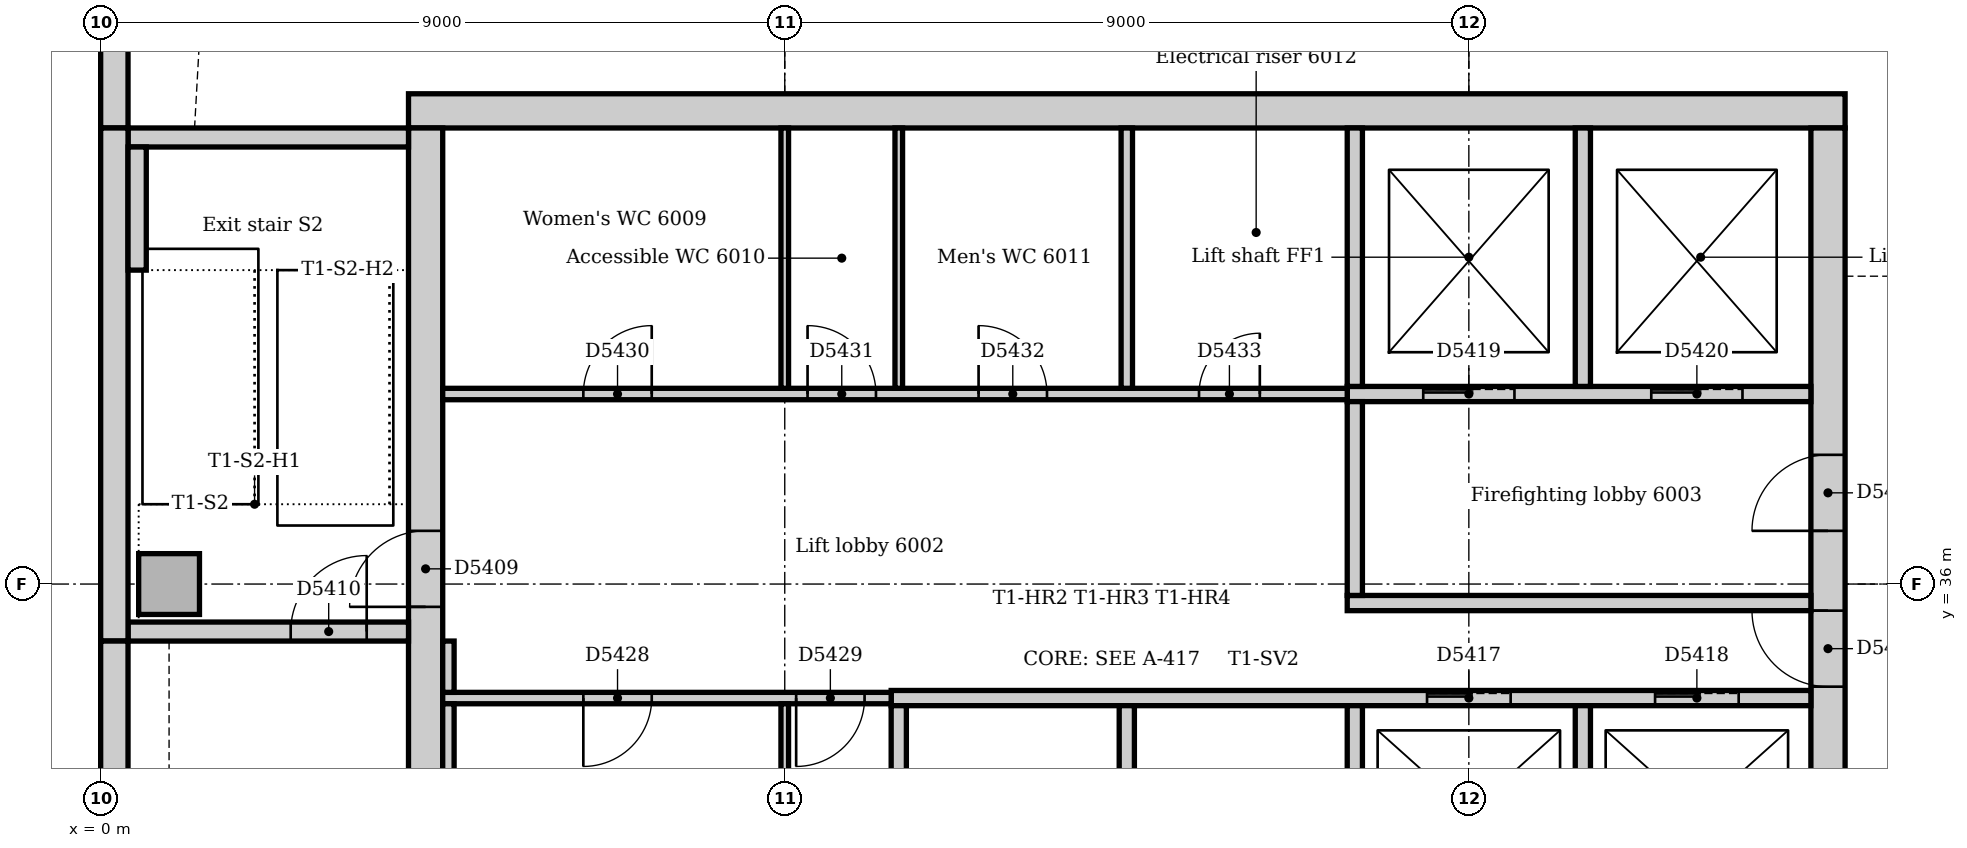
"""IFC4 building model, lengths in metres.
Left out: names, types, materials, properties, quantities, classifications, styles, units other than length and angle.
Written with IfcOpenShell. Run it as: python <this file> out.ifc"""

import sys

from ifc_helpers import new_model, si_unit, direction, frame, frame_2d, origin, origin_2d, place, context, subcontext, project, spatial, rectangle, extrude, element, fill, save


model = new_model("IFC4")
c1 = context("Model", 3, precision=1e-05, world=origin(), true_north=direction((0.0, 1.0)))
c2 = subcontext(c1, "Body", "Model", "MODEL_VIEW")
j1 = project(units=[si_unit("LENGTHUNIT", "METRE"), si_unit("PLANEANGLEUNIT", "RADIAN")], contexts=[c1])
p1 = place(None, origin())
s1 = spatial("IfcSite", under=j1, at=p1, CompositionType="ELEMENT")
p2 = place(p1, origin())
s2 = spatial("IfcBuilding", under=s1, at=p2, CompositionType="ELEMENT")
p3 = place(p2, frame((0.0, 0.0, 251.0)))
s3 = spatial("IfcBuildingStorey", under=s2, at=p3, CompositionType="ELEMENT", Elevation=251.0)
p4 = place(p3, frame((22.95, 42.225, 0.0), z_axis=(0.0, 0.0, 1.0), x_axis=(-1.0, 0.0, 0.0)))
e1 = element("IfcWall", 1, at=p4, inside=s3, PredefinedType="SOLIDWALL", context=c2, shape_type="SweptSolid", body=[
    extrude(rectangle(XDim=18.9, YDim=0.45, at=frame_2d((9.45, 0.0))), origin(), (0.0, 0.0, 1.0), 4.0),
])
p5 = place(p3, frame((22.725, 31.5, 0.0), z_axis=(0.0, 0.0, 1.0), x_axis=(0.0, 1.0, 0.0)))
e2 = element("IfcWall", 2, at=p5, inside=s3, PredefinedType="SOLIDWALL", context=c2, shape_type="SweptSolid", body=[
    extrude(rectangle(XDim=10.5, YDim=0.45, at=frame_2d((5.25, 0.0))), origin(), (0.0, 0.0, 1.0), 4.0),
])
p6 = place(p5, frame((3.15, 0.0, 0.0)))
e3 = element("IfcOpeningElement", 3, at=p6, cuts=e2, PredefinedType="OPENING", context=c2, shape_type="SweptSolid", body=[
    extrude(rectangle(XDim=1.0, YDim=2.1, at=frame_2d((0.5, 1.05))), frame((0.0, 0.235, 0.0), z_axis=(0.0, -1.0, 0.0), x_axis=(1.0, 0.0, 0.0)), (0.0, 0.0, 1.0), 0.47),
])
p7 = place(p5, frame((5.2, 0.0, 0.0)))
e4 = element("IfcOpeningElement", 4, at=p7, cuts=e2, PredefinedType="OPENING", context=c2, shape_type="SweptSolid", body=[
    extrude(rectangle(XDim=1.0, YDim=2.1, at=frame_2d((0.5, 1.05))), frame((0.0, 0.235, 0.0), z_axis=(0.0, -1.0, 0.0), x_axis=(1.0, 0.0, 0.0)), (0.0, 0.0, 1.0), 0.47),
])
p8 = place(p3, frame((4.275, 42.0, 0.0), z_axis=(0.0, 0.0, 1.0), x_axis=(0.0, -1.0, 0.0)))
e5 = element("IfcWall", 5, at=p8, inside=s3, PredefinedType="SOLIDWALL", context=c2, shape_type="SweptSolid", body=[
    extrude(rectangle(XDim=10.5, YDim=0.45, at=frame_2d((5.25, 0.0))), origin(), (0.0, 0.0, 1.0), 4.0),
])
p9 = place(p8, frame((5.3, 0.0, 0.0)))
e6 = element("IfcOpeningElement", 6, at=p9, cuts=e5, PredefinedType="OPENING", context=c2, shape_type="SweptSolid", body=[
    extrude(rectangle(XDim=1.0, YDim=2.1, at=frame_2d((0.5, 1.05))), frame((0.0, 0.235, 0.0), z_axis=(0.0, -1.0, 0.0), x_axis=(1.0, 0.0, 0.0)), (0.0, 0.0, 1.0), 0.47),
])
p10 = place(p3, frame((0.36, 35.375, 0.0), z_axis=(0.0, 0.0, 1.0), x_axis=(1.0, 0.0, 0.0)))
e7 = element("IfcWall", 7, at=p10, inside=s3, PredefinedType="SOLIDWALL", context=c2, shape_type="SweptSolid", body=[
    extrude(rectangle(XDim=3.69, YDim=0.25, at=frame_2d((1.845, 0.0))), origin(), (0.0, 0.0, 1.0), 4.0),
])
p11 = place(p10, frame((2.14, 0.0, 0.0)))
e8 = element("IfcOpeningElement", 8, at=p11, cuts=e7, PredefinedType="OPENING", context=c2, shape_type="SweptSolid", body=[
    extrude(rectangle(XDim=1.0, YDim=2.1, at=frame_2d((0.5, 1.05))), frame((0.0, 0.135, 0.0), z_axis=(0.0, -1.0, 0.0), x_axis=(1.0, 0.0, 0.0)), (0.0, 0.0, 1.0), 0.27),
])
p12 = place(p3, frame((4.05, 41.875, 0.0), z_axis=(0.0, 0.0, 1.0), x_axis=(-1.0, 0.0, 0.0)))
e9 = element("IfcWall", 9, at=p12, inside=s3, PredefinedType="SOLIDWALL", context=c2, shape_type="SweptSolid", body=[
    extrude(rectangle(XDim=3.69, YDim=0.25, at=frame_2d((1.845, 0.0))), origin(), (0.0, 0.0, 1.0), 4.0),
])
p13 = place(p3, frame((0.9, 36.0, 0.0), z_axis=(0.0, 0.0, 1.0), x_axis=(1.0, 0.0, 0.0)))
e10 = element("IfcColumn", 10, at=p13, inside=s3, PredefinedType="COLUMN", context=c2, shape_type="SweptSolid", body=[
    extrude(rectangle(XDim=0.8, YDim=0.8, at=origin_2d()), origin(), (0.0, 0.0, 1.0), 4.0),
])
p14 = place(p3, frame((0.18, 58.757, 0.0), z_axis=(0.0, 0.0, 1.0), x_axis=(0.0, -1.0, 0.0)))
e11 = element("IfcWall", 11, at=p14, inside=s3, PredefinedType="STANDARD", context=c2, shape_type="SweptSolid", body=[
    extrude(rectangle(XDim=16.757, YDim=0.36, at=frame_2d((8.379, 0.0))), origin(), (0.0, 0.0, 1.0), 3.85),
])
p15 = place(p14, frame((3.107, 0.0, 0.9)))
e12 = element("IfcOpeningElement", 12, at=p15, cuts=e11, PredefinedType="OPENING", context=c2, shape_type="SweptSolid", body=[
    extrude(rectangle(XDim=3.3, YDim=1.6, at=frame_2d((1.65, 0.8))), frame((0.0, 0.19, 0.0), z_axis=(0.0, -1.0, 0.0), x_axis=(1.0, 0.0, 0.0)), (0.0, 0.0, 1.0), 0.38),
])
p16 = place(p14, frame((7.307, 0.0, 0.9)))
e13 = element("IfcOpeningElement", 13, at=p16, cuts=e11, PredefinedType="OPENING", context=c2, shape_type="SweptSolid", body=[
    extrude(rectangle(XDim=3.3, YDim=1.6, at=frame_2d((1.65, 0.8))), frame((0.0, 0.19, 0.0), z_axis=(0.0, -1.0, 0.0), x_axis=(1.0, 0.0, 0.0)), (0.0, 0.0, 1.0), 0.38),
])
p17 = place(p14, frame((12.107, 0.0, 0.9)))
e14 = element("IfcOpeningElement", 14, at=p17, cuts=e11, PredefinedType="OPENING", context=c2, shape_type="SweptSolid", body=[
    extrude(rectangle(XDim=3.3, YDim=1.6, at=frame_2d((1.65, 0.8))), frame((0.0, 0.19, 0.0), z_axis=(0.0, -1.0, 0.0), x_axis=(1.0, 0.0, 0.0)), (0.0, 0.0, 1.0), 0.38),
])
p18 = place(p3, frame((0.18, 42.0, 0.0), z_axis=(0.0, 0.0, 1.0), x_axis=(0.0, -1.0, 0.0)))
e15 = element("IfcWall", 15, at=p18, inside=s3, PredefinedType="STANDARD", context=c2, shape_type="SweptSolid", body=[
    extrude(rectangle(XDim=6.75, YDim=0.36, at=frame_2d((3.375, 0.0))), origin(), (0.0, 0.0, 1.0), 3.85),
])
p19 = place(p3, frame((0.18, 35.25, 0.0), z_axis=(0.0, 0.0, 1.0), x_axis=(0.0, -1.0, 0.0)))
e16 = element("IfcWall", 16, at=p19, inside=s3, PredefinedType="STANDARD", context=c2, shape_type="SweptSolid", body=[
    extrude(rectangle(XDim=7.5, YDim=0.36, at=frame_2d((3.75, 0.0))), origin(), (0.0, 0.0, 1.0), 3.85),
])
p20 = place(p3, frame((0.48, 40.13, 0.0), z_axis=(0.0, 0.0, 1.0), x_axis=(0.0, 1.0, 0.0)))
e17 = element("IfcWall", 17, at=p20, inside=s3, PredefinedType="STANDARD", context=c2, shape_type="SweptSolid", body=[
    extrude(rectangle(XDim=1.62, YDim=0.24, at=frame_2d((0.81, 0.0))), origin(), (0.0, 0.0, 1.0), 4.0),
])
p21 = place(p3, frame((16.4, 35.75, 0.0), z_axis=(0.0, 0.0, 1.0), x_axis=(1.0, 0.0, 0.0)))
e18 = element("IfcWall", 18, at=p21, inside=s3, PredefinedType="PARTITIONING", context=c2, shape_type="SweptSolid", body=[
    extrude(rectangle(XDim=6.1, YDim=0.2, at=frame_2d((3.05, 0.0))), origin(), (0.0, 0.0, 1.0), 3.85),
])
p22 = place(p3, frame((16.4, 38.5, 0.0), z_axis=(0.0, 0.0, 1.0), x_axis=(1.0, 0.0, 0.0)))
e19 = element("IfcWall", 19, at=p22, inside=s3, PredefinedType="PARTITIONING", context=c2, shape_type="SweptSolid", body=[
    extrude(rectangle(XDim=6.1, YDim=0.2, at=frame_2d((3.05, 0.0))), origin(), (0.0, 0.0, 1.0), 3.85),
])
p23 = place(p22, frame((1.0, 0.0, 0.0)))
e20 = element("IfcOpeningElement", 20, at=p23, cuts=e19, PredefinedType="OPENING", context=c2, shape_type="SweptSolid", body=[
    extrude(rectangle(XDim=1.2, YDim=2.1, at=frame_2d((0.6, 1.05))), frame((0.0, 0.11, 0.0), z_axis=(0.0, -1.0, 0.0), x_axis=(1.0, 0.0, 0.0)), (0.0, 0.0, 1.0), 0.22),
])
p24 = place(p22, frame((4.0, 0.0, 0.0)))
e21 = element("IfcOpeningElement", 21, at=p24, cuts=e19, PredefinedType="OPENING", context=c2, shape_type="SweptSolid", body=[
    extrude(rectangle(XDim=1.2, YDim=2.1, at=frame_2d((0.6, 1.05))), frame((0.0, 0.11, 0.0), z_axis=(0.0, -1.0, 0.0), x_axis=(1.0, 0.0, 0.0)), (0.0, 0.0, 1.0), 0.22),
])
p25 = place(p3, frame((16.5, 35.85, 0.0), z_axis=(0.0, 0.0, 1.0), x_axis=(0.0, 1.0, 0.0)))
e22 = element("IfcWall", 22, at=p25, inside=s3, PredefinedType="PARTITIONING", context=c2, shape_type="SweptSolid", body=[
    extrude(rectangle(XDim=2.55, YDim=0.2, at=frame_2d((1.275, 0.0))), origin(), (0.0, 0.0, 1.0), 3.85),
])
p26 = place(p3, frame((10.4, 34.5, 0.0), z_axis=(0.0, 0.0, 1.0), x_axis=(1.0, 0.0, 0.0)))
e23 = element("IfcWall", 23, at=p26, inside=s3, PredefinedType="PARTITIONING", context=c2, shape_type="SweptSolid", body=[
    extrude(rectangle(XDim=12.1, YDim=0.2, at=frame_2d((6.05, 0.0))), origin(), (0.0, 0.0, 1.0), 3.85),
])
p27 = place(p26, frame((7.05, 0.0, 0.0)))
e24 = element("IfcOpeningElement", 24, at=p27, cuts=e23, PredefinedType="OPENING", context=c2, shape_type="SweptSolid", body=[
    extrude(rectangle(XDim=1.1, YDim=2.1, at=frame_2d((0.55, 1.05))), frame((0.0, 0.11, 0.0), z_axis=(0.0, -1.0, 0.0), x_axis=(1.0, 0.0, 0.0)), (0.0, 0.0, 1.0), 0.22),
])
p28 = place(p26, frame((10.05, 0.0, 0.0)))
e25 = element("IfcOpeningElement", 25, at=p28, cuts=e23, PredefinedType="OPENING", context=c2, shape_type="SweptSolid", body=[
    extrude(rectangle(XDim=1.1, YDim=2.1, at=frame_2d((0.55, 1.05))), frame((0.0, 0.11, 0.0), z_axis=(0.0, -1.0, 0.0), x_axis=(1.0, 0.0, 0.0)), (0.0, 0.0, 1.0), 0.22),
])
for number, where, z_axis, x_axis in (
    (26, (10.5, 31.75, 0.0), (0.0, 0.0, 1.0), (0.0, 1.0, 0.0)),
    (27, (13.5, 31.75, 0.0), (0.0, 0.0, 1.0), (0.0, 1.0, 0.0)),
    (28, (16.5, 31.75, 0.0), (0.0, 0.0, 1.0), (0.0, 1.0, 0.0)),
    (29, (19.5, 31.75, 0.0), (0.0, 0.0, 1.0), (0.0, 1.0, 0.0)),
):
    element("IfcWall", number, at=place(p3, frame(where, z_axis=z_axis, x_axis=x_axis)), inside=s3, PredefinedType="PARTITIONING", context=c2, shape_type="SweptSolid", body=[
        extrude(rectangle(XDim=2.65, YDim=0.2, at=frame_2d((1.325, 0.0))), origin(), (0.0, 0.0, 1.0), 3.85),
    ])
for number, where, z_axis, x_axis in (
    (30, (16.5, 38.6, 0.0), (0.0, 0.0, 1.0), (0.0, 1.0, 0.0)),
    (31, (19.5, 38.6, 0.0), (0.0, 0.0, 1.0), (0.0, 1.0, 0.0)),
):
    element("IfcWall", number, at=place(p3, frame(where, z_axis=z_axis, x_axis=x_axis)), inside=s3, PredefinedType="PARTITIONING", context=c2, shape_type="SweptSolid", body=[
        extrude(rectangle(XDim=3.4, YDim=0.2, at=frame_2d((1.7, 0.0))), origin(), (0.0, 0.0, 1.0), 3.85),
    ])
p29 = place(p3, frame((4.5, 38.5, 0.0), z_axis=(0.0, 0.0, 1.0), x_axis=(1.0, 0.0, 0.0)))
e32 = element("IfcWall", 32, at=p29, inside=s3, PredefinedType="PARTITIONING", context=c2, shape_type="SweptSolid", body=[
    extrude(rectangle(XDim=11.9, YDim=0.15, at=frame_2d((5.95, 0.0))), origin(), (0.0, 0.0, 1.0), 3.85),
])
p30 = place(p29, frame((1.85, 0.0, 0.0)))
e33 = element("IfcOpeningElement", 33, at=p30, cuts=e32, PredefinedType="OPENING", context=c2, shape_type="SweptSolid", body=[
    extrude(rectangle(XDim=0.9, YDim=2.1, at=frame_2d((0.45, 1.05))), frame((0.0, 0.085, 0.0), z_axis=(0.0, -1.0, 0.0), x_axis=(1.0, 0.0, 0.0)), (0.0, 0.0, 1.0), 0.17),
])
p31 = place(p29, frame((4.8, 0.0, 0.0)))
e34 = element("IfcOpeningElement", 34, at=p31, cuts=e32, PredefinedType="OPENING", context=c2, shape_type="SweptSolid", body=[
    extrude(rectangle(XDim=0.9, YDim=2.1, at=frame_2d((0.45, 1.05))), frame((0.0, 0.085, 0.0), z_axis=(0.0, -1.0, 0.0), x_axis=(1.0, 0.0, 0.0)), (0.0, 0.0, 1.0), 0.17),
])
p32 = place(p29, frame((7.05, 0.0, 0.0)))
e35 = element("IfcOpeningElement", 35, at=p32, cuts=e32, PredefinedType="OPENING", context=c2, shape_type="SweptSolid", body=[
    extrude(rectangle(XDim=0.9, YDim=2.1, at=frame_2d((0.45, 1.05))), frame((0.0, 0.085, 0.0), z_axis=(0.0, -1.0, 0.0), x_axis=(1.0, 0.0, 0.0)), (0.0, 0.0, 1.0), 0.17),
])
p33 = place(p29, frame((9.95, 0.0, 0.0)))
e36 = element("IfcOpeningElement", 36, at=p33, cuts=e32, PredefinedType="OPENING", context=c2, shape_type="SweptSolid", body=[
    extrude(rectangle(XDim=0.8, YDim=2.1, at=frame_2d((0.4, 1.05))), frame((0.0, 0.085, 0.0), z_axis=(0.0, -1.0, 0.0), x_axis=(1.0, 0.0, 0.0)), (0.0, 0.0, 1.0), 0.17),
])
p34 = place(p3, frame((4.5, 34.5, 0.0), z_axis=(0.0, 0.0, 1.0), x_axis=(1.0, 0.0, 0.0)))
e37 = element("IfcWall", 37, at=p34, inside=s3, PredefinedType="PARTITIONING", context=c2, shape_type="SweptSolid", body=[
    extrude(rectangle(XDim=5.9, YDim=0.15, at=frame_2d((2.95, 0.0))), origin(), (0.0, 0.0, 1.0), 3.85),
])
p35 = place(p34, frame((1.85, 0.0, 0.0)))
e38 = element("IfcOpeningElement", 38, at=p35, cuts=e37, PredefinedType="OPENING", context=c2, shape_type="SweptSolid", body=[
    extrude(rectangle(XDim=0.9, YDim=2.1, at=frame_2d((0.45, 1.05))), frame((0.0, 0.085, 0.0), z_axis=(0.0, -1.0, 0.0), x_axis=(1.0, 0.0, 0.0)), (0.0, 0.0, 1.0), 0.17),
])
p36 = place(p34, frame((4.65, 0.0, 0.0)))
e39 = element("IfcOpeningElement", 39, at=p36, cuts=e37, PredefinedType="OPENING", context=c2, shape_type="SweptSolid", body=[
    extrude(rectangle(XDim=0.9, YDim=2.1, at=frame_2d((0.45, 1.05))), frame((0.0, 0.085, 0.0), z_axis=(0.0, -1.0, 0.0), x_axis=(1.0, 0.0, 0.0)), (0.0, 0.0, 1.0), 0.17),
])
p37 = place(p3, frame((4.575, 34.575, 0.0), z_axis=(0.0, 0.0, 1.0), x_axis=(0.0, 1.0, 0.0)))
e40 = element("IfcWall", 40, at=p37, inside=s3, PredefinedType="PARTITIONING", context=c2, shape_type="SweptSolid", body=[
    extrude(rectangle(XDim=0.675, YDim=0.15, at=frame_2d((0.338, 0.0))), origin(), (0.0, 0.0, 1.0), 3.85),
])
p38 = place(p3, frame((4.575, 31.75, 0.0), z_axis=(0.0, 0.0, 1.0), x_axis=(0.0, 1.0, 0.0)))
e41 = element("IfcWall", 41, at=p38, inside=s3, PredefinedType="PARTITIONING", context=c2, shape_type="SweptSolid", body=[
    extrude(rectangle(XDim=2.675, YDim=0.15, at=frame_2d((1.337, 0.0))), origin(), (0.0, 0.0, 1.0), 3.85),
])
p39 = place(p3, frame((13.5, 38.575, 0.0), z_axis=(0.0, 0.0, 1.0), x_axis=(0.0, 1.0, 0.0)))
e42 = element("IfcWall", 42, at=p39, inside=s3, PredefinedType="PARTITIONING", context=c2, shape_type="SweptSolid", body=[
    extrude(rectangle(XDim=3.425, YDim=0.15, at=frame_2d((1.712, 0.0))), origin(), (0.0, 0.0, 1.0), 3.85),
])
for number, where, z_axis, x_axis in (
    (43, (9.0, 38.575, 0.0), (0.0, 0.0, 1.0), (0.0, 1.0, 0.0)),
    (44, (10.5, 38.575, 0.0), (0.0, 0.0, 1.0), (0.0, 1.0, 0.0)),
):
    element("IfcWall", number, at=place(p3, frame(where, z_axis=z_axis, x_axis=x_axis)), inside=s3, PredefinedType="PARTITIONING", context=c2, shape_type="SweptSolid", body=[
        extrude(rectangle(XDim=3.425, YDim=0.1, at=frame_2d((1.712, 0.0))), origin(), (0.0, 0.0, 1.0), 3.85),
    ])
p40 = place(p3, frame((9.0, 31.75, 0.0), z_axis=(0.0, 0.0, 1.0), x_axis=(0.0, 1.0, 0.0)))
e45 = element("IfcWall", 45, at=p40, inside=s3, PredefinedType="PARTITIONING", context=c2, shape_type="SweptSolid", body=[
    extrude(rectangle(XDim=2.675, YDim=0.1, at=frame_2d((1.337, 0.0))), origin(), (0.0, 0.0, 1.0), 3.85),
])
p41 = place(p9, frame((1.0, 0.0, 0.0), z_axis=(0.0, 0.0, 1.0), x_axis=(-1.0, 0.0, 0.0)))
e46 = element("IfcDoor", 46, at=p41, inside=s3, OperationType="SINGLE_SWING_LEFT", PredefinedType="DOOR", context=c2, shape_type="SweptSolid", body=[
    extrude(rectangle(XDim=1.0, YDim=2.1, at=frame_2d((0.5, 1.05))), frame((0.0, 0.025, 0.0), z_axis=(0.0, -1.0, 0.0), x_axis=(1.0, 0.0, 0.0)), (0.0, 0.0, 1.0), 0.05),
])
fill(e6, e46)
p42 = place(p11, origin())
e47 = element("IfcDoor", 47, at=p42, inside=s3, OperationType="SINGLE_SWING_RIGHT", PredefinedType="DOOR", context=c2, shape_type="SweptSolid", body=[
    extrude(rectangle(XDim=1.0, YDim=2.1, at=frame_2d((0.5, 1.05))), frame((0.0, 0.025, 0.0), z_axis=(0.0, -1.0, 0.0), x_axis=(1.0, 0.0, 0.0)), (0.0, 0.0, 1.0), 0.05),
])
fill(e8, e47)
p43 = place(p27, origin())
e48 = element("IfcDoor", 48, at=p43, inside=s3, OperationType="SLIDING_TO_LEFT", PredefinedType="DOOR", context=c2, shape_type="SweptSolid", body=[
    extrude(rectangle(XDim=1.1, YDim=2.1, at=frame_2d((0.55, 1.05))), frame((0.0, 0.025, 0.0), z_axis=(0.0, -1.0, 0.0), x_axis=(1.0, 0.0, 0.0)), (0.0, 0.0, 1.0), 0.05),
])
fill(e24, e48)
p44 = place(p28, origin())
e49 = element("IfcDoor", 49, at=p44, inside=s3, OperationType="SLIDING_TO_LEFT", PredefinedType="DOOR", context=c2, shape_type="SweptSolid", body=[
    extrude(rectangle(XDim=1.1, YDim=2.1, at=frame_2d((0.55, 1.05))), frame((0.0, 0.025, 0.0), z_axis=(0.0, -1.0, 0.0), x_axis=(1.0, 0.0, 0.0)), (0.0, 0.0, 1.0), 0.05),
])
fill(e25, e49)
p45 = place(p23, origin())
e50 = element("IfcDoor", 50, at=p45, inside=s3, OperationType="SLIDING_TO_LEFT", PredefinedType="DOOR", context=c2, shape_type="SweptSolid", body=[
    extrude(rectangle(XDim=1.2, YDim=2.1, at=frame_2d((0.6, 1.05))), frame((0.0, 0.025, 0.0), z_axis=(0.0, -1.0, 0.0), x_axis=(1.0, 0.0, 0.0)), (0.0, 0.0, 1.0), 0.05),
])
fill(e20, e50)
p46 = place(p24, origin())
e51 = element("IfcDoor", 51, at=p46, inside=s3, OperationType="SLIDING_TO_LEFT", PredefinedType="DOOR", context=c2, shape_type="SweptSolid", body=[
    extrude(rectangle(XDim=1.2, YDim=2.1, at=frame_2d((0.6, 1.05))), frame((0.0, 0.025, 0.0), z_axis=(0.0, -1.0, 0.0), x_axis=(1.0, 0.0, 0.0)), (0.0, 0.0, 1.0), 0.05),
])
fill(e21, e51)
p47 = place(p6, origin())
e52 = element("IfcDoor", 52, at=p47, inside=s3, OperationType="SINGLE_SWING_RIGHT", PredefinedType="DOOR", context=c2, shape_type="SweptSolid", body=[
    extrude(rectangle(XDim=1.0, YDim=2.1, at=frame_2d((0.5, 1.05))), frame((0.0, 0.025, 0.0), z_axis=(0.0, -1.0, 0.0), x_axis=(1.0, 0.0, 0.0)), (0.0, 0.0, 1.0), 0.05),
])
fill(e3, e52)
p48 = place(p7, origin())
e53 = element("IfcDoor", 53, at=p48, inside=s3, OperationType="SINGLE_SWING_LEFT", PredefinedType="DOOR", context=c2, shape_type="SweptSolid", body=[
    extrude(rectangle(XDim=1.0, YDim=2.1, at=frame_2d((0.5, 1.05))), frame((0.0, 0.025, 0.0), z_axis=(0.0, -1.0, 0.0), x_axis=(1.0, 0.0, 0.0)), (0.0, 0.0, 1.0), 0.05),
])
fill(e4, e53)
p49 = place(p35, frame((0.9, 0.0, 0.0), z_axis=(0.0, 0.0, 1.0), x_axis=(-1.0, 0.0, 0.0)))
e54 = element("IfcDoor", 54, at=p49, inside=s3, OperationType="SINGLE_SWING_RIGHT", PredefinedType="DOOR", context=c2, shape_type="SweptSolid", body=[
    extrude(rectangle(XDim=0.9, YDim=2.1, at=frame_2d((0.45, 1.05))), frame((0.0, 0.025, 0.0), z_axis=(0.0, -1.0, 0.0), x_axis=(1.0, 0.0, 0.0)), (0.0, 0.0, 1.0), 0.05),
])
fill(e38, e54)
p50 = place(p36, frame((0.9, 0.0, 0.0), z_axis=(0.0, 0.0, 1.0), x_axis=(-1.0, 0.0, 0.0)))
e55 = element("IfcDoor", 55, at=p50, inside=s3, OperationType="SINGLE_SWING_RIGHT", PredefinedType="DOOR", context=c2, shape_type="SweptSolid", body=[
    extrude(rectangle(XDim=0.9, YDim=2.1, at=frame_2d((0.45, 1.05))), frame((0.0, 0.025, 0.0), z_axis=(0.0, -1.0, 0.0), x_axis=(1.0, 0.0, 0.0)), (0.0, 0.0, 1.0), 0.05),
])
fill(e39, e55)
p51 = place(p30, origin())
e56 = element("IfcDoor", 56, at=p51, inside=s3, OperationType="SINGLE_SWING_RIGHT", PredefinedType="DOOR", context=c2, shape_type="SweptSolid", body=[
    extrude(rectangle(XDim=0.9, YDim=2.1, at=frame_2d((0.45, 1.05))), frame((0.0, 0.025, 0.0), z_axis=(0.0, -1.0, 0.0), x_axis=(1.0, 0.0, 0.0)), (0.0, 0.0, 1.0), 0.05),
])
fill(e33, e56)
p52 = place(p31, origin())
e57 = element("IfcDoor", 57, at=p52, inside=s3, OperationType="SINGLE_SWING_LEFT", PredefinedType="DOOR", context=c2, shape_type="SweptSolid", body=[
    extrude(rectangle(XDim=0.9, YDim=2.1, at=frame_2d((0.45, 1.05))), frame((0.0, 0.025, 0.0), z_axis=(0.0, -1.0, 0.0), x_axis=(1.0, 0.0, 0.0)), (0.0, 0.0, 1.0), 0.05),
])
fill(e34, e57)
p53 = place(p32, origin())
e58 = element("IfcDoor", 58, at=p53, inside=s3, OperationType="SINGLE_SWING_LEFT", PredefinedType="DOOR", context=c2, shape_type="SweptSolid", body=[
    extrude(rectangle(XDim=0.9, YDim=2.1, at=frame_2d((0.45, 1.05))), frame((0.0, 0.025, 0.0), z_axis=(0.0, -1.0, 0.0), x_axis=(1.0, 0.0, 0.0)), (0.0, 0.0, 1.0), 0.05),
])
fill(e35, e58)
p54 = place(p33, origin())
e59 = element("IfcDoor", 59, at=p54, inside=s3, OperationType="SINGLE_SWING_RIGHT", PredefinedType="DOOR", context=c2, shape_type="SweptSolid", body=[
    extrude(rectangle(XDim=0.8, YDim=2.1, at=frame_2d((0.4, 1.05))), frame((0.0, 0.025, 0.0), z_axis=(0.0, -1.0, 0.0), x_axis=(1.0, 0.0, 0.0)), (0.0, 0.0, 1.0), 0.05),
])
fill(e36, e59)
save(model, sys.argv[1])
